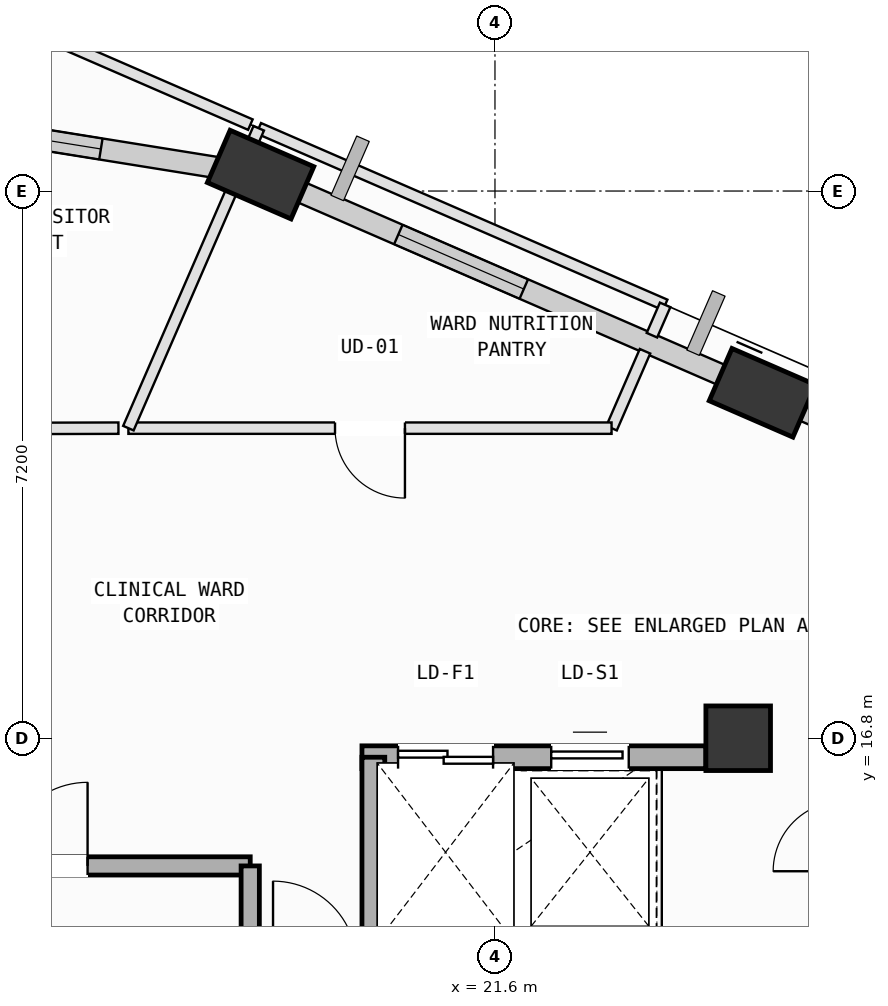
"""IFC4 building model, lengths in metres.
Left out: names, types, materials, properties, quantities, classifications, styles, units other than length and angle.
Written with IfcOpenShell. Run it as: python <this file> out.ifc"""

import sys

from ifc_helpers import new_model, si_unit, direction, frame, frame_2d, origin, origin_2d, place, context, subcontext, project, spatial, rectangle, extrude, element, fill, save


model = new_model("IFC4")
c1 = context("Model", 3, precision=1e-05, world=origin(), true_north=direction((0.0, 1.0)))
c2 = subcontext(c1, "Body", "Model", "MODEL_VIEW")
j1 = project(units=[si_unit("LENGTHUNIT", "METRE"), si_unit("PLANEANGLEUNIT", "RADIAN")], contexts=[c1])
p1 = place(None, origin())
s1 = spatial("IfcSite", under=j1, at=p1, CompositionType="ELEMENT")
p2 = place(p1, origin())
s2 = spatial("IfcBuilding", under=s1, at=p2, CompositionType="ELEMENT")
p3 = place(p2, frame((0.0, 0.0, 312.6)))
s3 = spatial("IfcBuildingStorey", under=s2, at=p3, CompositionType="ELEMENT", Elevation=312.6)
p4 = place(p3, frame((24.8, 16.8, 0.0), z_axis=(0.0, 0.0, 1.0), x_axis=(1.0, 0.0, 0.0)))
e1 = element("IfcColumn", 1, at=p4, inside=s3, PredefinedType="COLUMN", context=c2, shape_type="SweptSolid", body=[
    extrude(rectangle(XDim=0.85, YDim=0.85, at=origin_2d()), origin(), (0.0, 0.0, 1.0), 4.0),
])
for number, where, z_axis, x_axis in (
    (2, (25.119, 21.345, 0.002), (0.0, 0.0, 1.0), (-0.917, 0.399, 0.0)),
    (3, (18.516, 24.216, 0.002), (0.0, 0.0, 1.0), (-0.917, 0.399, 0.0)),
):
    element("IfcColumn", number, at=place(p3, frame(where, z_axis=z_axis, x_axis=x_axis)), inside=s3, PredefinedType="COLUMN", context=c2, shape_type="SweptSolid", body=[
        extrude(rectangle(XDim=1.2, YDim=0.75, at=origin_2d()), origin(), (0.0, 0.0, 1.0), 3.996),
    ])
p5 = place(p3, frame((25.484, 21.187, 0.0), z_axis=(0.0, 0.0, 1.0), x_axis=(0.917060568388, -0.398747932794, 0.0)))
e4 = element("IfcWall", 4, at=p5, inside=s3, PredefinedType="SOLIDWALL", context=c2, shape_type="SweptSolid", body=[
    extrude(rectangle(XDim=6.955, YDim=0.28, at=frame_2d((3.478, 0.0))), origin(), (0.0, 0.0, 1.0), 2.765),
])
p6 = place(p3, frame((18.881, 24.058, 0.0), z_axis=(0.0, 0.0, 1.0), x_axis=(0.917070056253, -0.398726111414, 0.0)))
e5 = element("IfcWall", 5, at=p6, inside=s3, PredefinedType="SOLIDWALL", context=c2, shape_type="SweptSolid", body=[
    extrude(rectangle(XDim=6.405, YDim=0.28, at=frame_2d((3.202, 0.0))), origin(), (0.0, 0.0, 1.0), 3.265),
])
p7 = place(p6, frame((1.579, 0.0, 0.75)))
e6 = element("IfcOpeningElement", 6, at=p7, cuts=e5, PredefinedType="OPENING", context=c2, shape_type="SweptSolid", body=[
    extrude(rectangle(XDim=1.8, YDim=2.05, at=frame_2d((0.9, 1.025))), frame((0.0, 0.15, 0.0), z_axis=(0.0, -1.0, 0.0), x_axis=(1.0, 0.0, 0.0)), (0.0, 0.0, 1.0), 0.3),
])
p8 = place(p3, frame((12.946, 25.11, 0.0), z_axis=(0.0, 0.0, 1.0), x_axis=(0.987363821305, -0.158469821666, 0.0)))
e7 = element("IfcWall", 7, at=p8, inside=s3, PredefinedType="SOLIDWALL", context=c2, shape_type="SweptSolid", body=[
    extrude(rectangle(XDim=5.244, YDim=0.28, at=frame_2d((2.622, 0.0))), origin(), (0.0, 0.0, 1.0), 3.265),
])
p9 = place(p8, frame((2.314, 0.0, 0.75)))
e8 = element("IfcOpeningElement", 8, at=p9, cuts=e7, PredefinedType="OPENING", context=c2, shape_type="SweptSolid", body=[
    extrude(rectangle(XDim=1.2, YDim=1.75, at=frame_2d((0.6, 0.875))), frame((0.0, 0.15, 0.0), z_axis=(0.0, -1.0, 0.0), x_axis=(1.0, 0.0, 0.0)), (0.0, 0.0, 1.0), 0.3),
])
p10 = place(p3, frame((14.92, 15.12, 0.0), z_axis=(0.0, 0.0, 1.0), x_axis=(1.0, 0.0, 0.0)))
e9 = element("IfcWall", 9, at=p10, inside=s3, PredefinedType="SOLIDWALL", context=c2, shape_type="SweptSolid", body=[
    extrude(rectangle(XDim=3.46, YDim=0.24, at=frame_2d((1.73, 0.0))), origin(), (0.0, 0.0, 1.0), 3.78),
])
p11 = place(p10, frame((0.22, 0.0, 0.0)))
e10 = element("IfcOpeningElement", 10, at=p11, cuts=e9, PredefinedType="OPENING", context=c2, shape_type="SweptSolid", body=[
    extrude(rectangle(XDim=1.1, YDim=2.15, at=frame_2d((0.55, 1.075))), frame((0.0, 0.13, 0.0), z_axis=(0.0, -1.0, 0.0), x_axis=(1.0, 0.0, 0.0)), (0.0, 0.0, 1.0), 0.26),
])
p12 = place(p3, frame((18.38, 15.12, 0.0), z_axis=(0.0, 0.0, 1.0), x_axis=(0.0, -1.0, 0.0)))
e11 = element("IfcWall", 11, at=p12, inside=s3, PredefinedType="SOLIDWALL", context=c2, shape_type="SweptSolid", body=[
    extrude(rectangle(XDim=7.095, YDim=0.24, at=frame_2d((3.548, 0.0))), origin(), (0.0, 0.0, 1.0), 3.78),
])
p13 = place(p3, frame((19.85, 16.55, 0.0), z_axis=(0.0, 0.0, 1.0), x_axis=(1.0, 0.0, 0.0)))
e12 = element("IfcWall", 12, at=p13, inside=s3, PredefinedType="SOLIDWALL", context=c2, shape_type="SweptSolid", body=[
    extrude(rectangle(XDim=4.525, YDim=0.3, at=frame_2d((2.262, 0.0))), origin(), (0.0, 0.0, 1.0), 3.78),
])
p14 = place(p13, frame((0.475, 0.0, 0.0)))
e13 = element("IfcOpeningElement", 13, at=p14, cuts=e12, PredefinedType="OPENING", context=c2, shape_type="SweptSolid", body=[
    extrude(rectangle(XDim=1.25, YDim=2.18, at=frame_2d((0.625, 1.09))), frame((0.0, 0.16, 0.0), z_axis=(0.0, -1.0, 0.0), x_axis=(1.0, 0.0, 0.0)), (0.0, 0.0, 1.0), 0.32),
])
p15 = place(p13, frame((2.49, 0.0, 0.0)))
e14 = element("IfcOpeningElement", 14, at=p15, cuts=e12, PredefinedType="OPENING", context=c2, shape_type="SweptSolid", body=[
    extrude(rectangle(XDim=1.02, YDim=2.12, at=frame_2d((0.51, 1.06))), frame((0.0, 0.16, 0.0), z_axis=(0.0, -1.0, 0.0), x_axis=(1.0, 0.0, 0.0)), (0.0, 0.0, 1.0), 0.32),
])
p16 = place(p3, frame((20.0, 13.82, 0.0), z_axis=(0.0, 0.0, 1.0), x_axis=(0.0, 1.0, 0.0)))
e15 = element("IfcWall", 15, at=p16, inside=s3, PredefinedType="SOLIDWALL", context=c2, shape_type="SweptSolid", body=[
    extrude(rectangle(XDim=2.73, YDim=0.3, at=frame_2d((1.365, 0.0))), origin(), (0.0, 0.0, 1.0), 3.78),
])
p17 = place(p3, frame((18.492, 24.826, 0.0), z_axis=(0.0, 0.0, 1.0), x_axis=(0.917125302545, -0.398599020862, 0.0)))
e16 = element("IfcWall", 16, at=p17, inside=s3, PredefinedType="PARTITIONING", context=c2, shape_type="SweptSolid", body=[
    extrude(rectangle(XDim=5.83, YDim=0.15, at=frame_2d((2.915, 0.0))), origin(), (0.0, 0.0, 1.0), 3.78),
])
p18 = place(p3, frame((23.839, 22.502, 0.0), z_axis=(0.0, 0.0, 1.0), x_axis=(-0.399935888769, -0.916543116757, 0.0)))
e17 = element("IfcWall", 17, at=p18, inside=s3, PredefinedType="PARTITIONING", context=c2, shape_type="SweptSolid", body=[
    extrude(rectangle(XDim=0.435, YDim=0.15, at=frame_2d((0.218, 0.0))), origin(), (0.0, 0.0, 1.0), 3.78),
])
p19 = place(p3, frame((23.574, 21.892, 0.0), z_axis=(0.0, 0.0, 1.0), x_axis=(-0.398612867881, -0.917119284259, 0.0)))
e18 = element("IfcWall", 18, at=p19, inside=s3, PredefinedType="PARTITIONING", context=c2, shape_type="SweptSolid", body=[
    extrude(rectangle(XDim=1.104, YDim=0.15, at=frame_2d((0.552, 0.0))), origin(), (0.0, 0.0, 1.0), 3.78),
])
p20 = place(p3, frame((23.134, 20.88, 0.0), z_axis=(0.0, 0.0, 1.0), x_axis=(-1.0, 0.0, 0.0)))
e19 = element("IfcWall", 19, at=p20, inside=s3, PredefinedType="PARTITIONING", context=c2, shape_type="SweptSolid", body=[
    extrude(rectangle(XDim=6.357, YDim=0.15, at=frame_2d((3.178, 0.0))), origin(), (0.0, 0.0, 1.0), 3.78),
])
p21 = place(p20, frame((2.719, 0.0, 0.0)))
e20 = element("IfcOpeningElement", 20, at=p21, cuts=e19, PredefinedType="OPENING", context=c2, shape_type="SweptSolid", body=[
    extrude(rectangle(XDim=0.92, YDim=2.1, at=frame_2d((0.46, 1.05))), frame((0.0, 0.085, 0.0), z_axis=(0.0, -1.0, 0.0), x_axis=(1.0, 0.0, 0.0)), (0.0, 0.0, 1.0), 0.17),
])
p22 = place(p3, frame((16.777, 20.88, 0.0), z_axis=(0.0, 0.0, 1.0), x_axis=(0.398564265288, 0.917140407154, 0.0)))
e21 = element("IfcWall", 21, at=p22, inside=s3, PredefinedType="PARTITIONING", context=c2, shape_type="SweptSolid", body=[
    extrude(rectangle(XDim=4.302, YDim=0.15, at=frame_2d((2.151, 0.0))), origin(), (0.0, 0.0, 1.0), 2.765),
])
p23 = place(p3, frame((14.288, 26.654, 0.0), z_axis=(0.0, 0.0, 1.0), x_axis=(0.91706744789, -0.398732110595, 0.0)))
e22 = element("IfcWall", 22, at=p23, inside=s3, PredefinedType="PARTITIONING", context=c2, shape_type="SweptSolid", body=[
    extrude(rectangle(XDim=4.464, YDim=0.15, at=frame_2d((2.232, 0.0))), origin(), (0.0, 0.0, 1.0), 3.78),
])
p24 = place(p3, frame((16.646, 20.88, 0.0), z_axis=(0.0, 0.0, 1.0), x_axis=(-0.999996442777, -0.002667289427, 0.0)))
e23 = element("IfcWall", 23, at=p24, inside=s3, PredefinedType="PARTITIONING", context=c2, shape_type="SweptSolid", body=[
    extrude(rectangle(XDim=4.119, YDim=0.15, at=frame_2d((2.06, 0.0))), origin(), (0.0, 0.0, 1.0), 3.415),
])
p25 = place(p24, frame((1.6, 0.0, 0.0)))
e24 = element("IfcOpeningElement", 24, at=p25, cuts=e23, PredefinedType="OPENING", context=c2, shape_type="SweptSolid", body=[
    extrude(rectangle(XDim=0.92, YDim=2.1, at=frame_2d((0.46, 1.05))), frame((0.0, 0.085, 0.0), z_axis=(0.0, -1.0, 0.0), x_axis=(1.0, 0.0, 0.0)), (0.0, 0.0, 1.0), 0.17),
])
p26 = place(p7, origin())
e25 = element("IfcWindow", 25, at=p26, inside=s3, PartitioningType="SINGLE_PANEL", PredefinedType="WINDOW", context=c2, shape_type="SweptSolid", body=[
    extrude(rectangle(XDim=1.8, YDim=2.05, at=frame_2d((0.9, 1.025))), frame((0.0, 0.03, 0.0), z_axis=(0.0, -1.0, 0.0), x_axis=(1.0, 0.0, 0.0)), (0.0, 0.0, 1.0), 0.06),
])
fill(e6, e25)
p27 = place(p9, origin())
e26 = element("IfcWindow", 26, at=p27, inside=s3, PartitioningType="SINGLE_PANEL", PredefinedType="WINDOW", context=c2, shape_type="SweptSolid", body=[
    extrude(rectangle(XDim=1.2, YDim=1.75, at=frame_2d((0.6, 0.875))), frame((0.0, 0.03, 0.0), z_axis=(0.0, -1.0, 0.0), x_axis=(1.0, 0.0, 0.0)), (0.0, 0.0, 1.0), 0.06),
])
fill(e8, e26)
p28 = place(p11, origin())
e27 = element("IfcDoor", 27, at=p28, inside=s3, OperationType="SINGLE_SWING_RIGHT", PredefinedType="DOOR", context=c2, shape_type="SweptSolid", body=[
    extrude(rectangle(XDim=1.1, YDim=2.15, at=frame_2d((0.55, 1.075))), frame((0.0, 0.025, 0.0), z_axis=(0.0, -1.0, 0.0), x_axis=(1.0, 0.0, 0.0)), (0.0, 0.0, 1.0), 0.05),
])
fill(e10, e27)
p29 = place(p14, origin())
e28 = element("IfcDoor", 28, at=p29, inside=s3, OperationType="DOUBLE_DOOR_SLIDING", PredefinedType="DOOR", context=c2, shape_type="SweptSolid", body=[
    extrude(rectangle(XDim=1.25, YDim=2.18, at=frame_2d((0.625, 1.09))), frame((0.0, 0.025, 0.0), z_axis=(0.0, -1.0, 0.0), x_axis=(1.0, 0.0, 0.0)), (0.0, 0.0, 1.0), 0.05),
])
fill(e13, e28)
p30 = place(p15, origin())
e29 = element("IfcDoor", 29, at=p30, inside=s3, OperationType="SLIDING_TO_LEFT", PredefinedType="DOOR", context=c2, shape_type="SweptSolid", body=[
    extrude(rectangle(XDim=1.02, YDim=2.12, at=frame_2d((0.51, 1.06))), frame((0.0, 0.025, 0.0), z_axis=(0.0, -1.0, 0.0), x_axis=(1.0, 0.0, 0.0)), (0.0, 0.0, 1.0), 0.05),
])
fill(e14, e29)
p31 = place(p21, origin())
e30 = element("IfcDoor", 30, at=p31, inside=s3, OperationType="SINGLE_SWING_LEFT", PredefinedType="DOOR", context=c2, shape_type="SweptSolid", body=[
    extrude(rectangle(XDim=0.92, YDim=2.1, at=frame_2d((0.46, 1.05))), frame((0.0, 0.025, 0.0), z_axis=(0.0, -1.0, 0.0), x_axis=(1.0, 0.0, 0.0)), (0.0, 0.0, 1.0), 0.05),
])
fill(e20, e30)
save(model, sys.argv[1])
